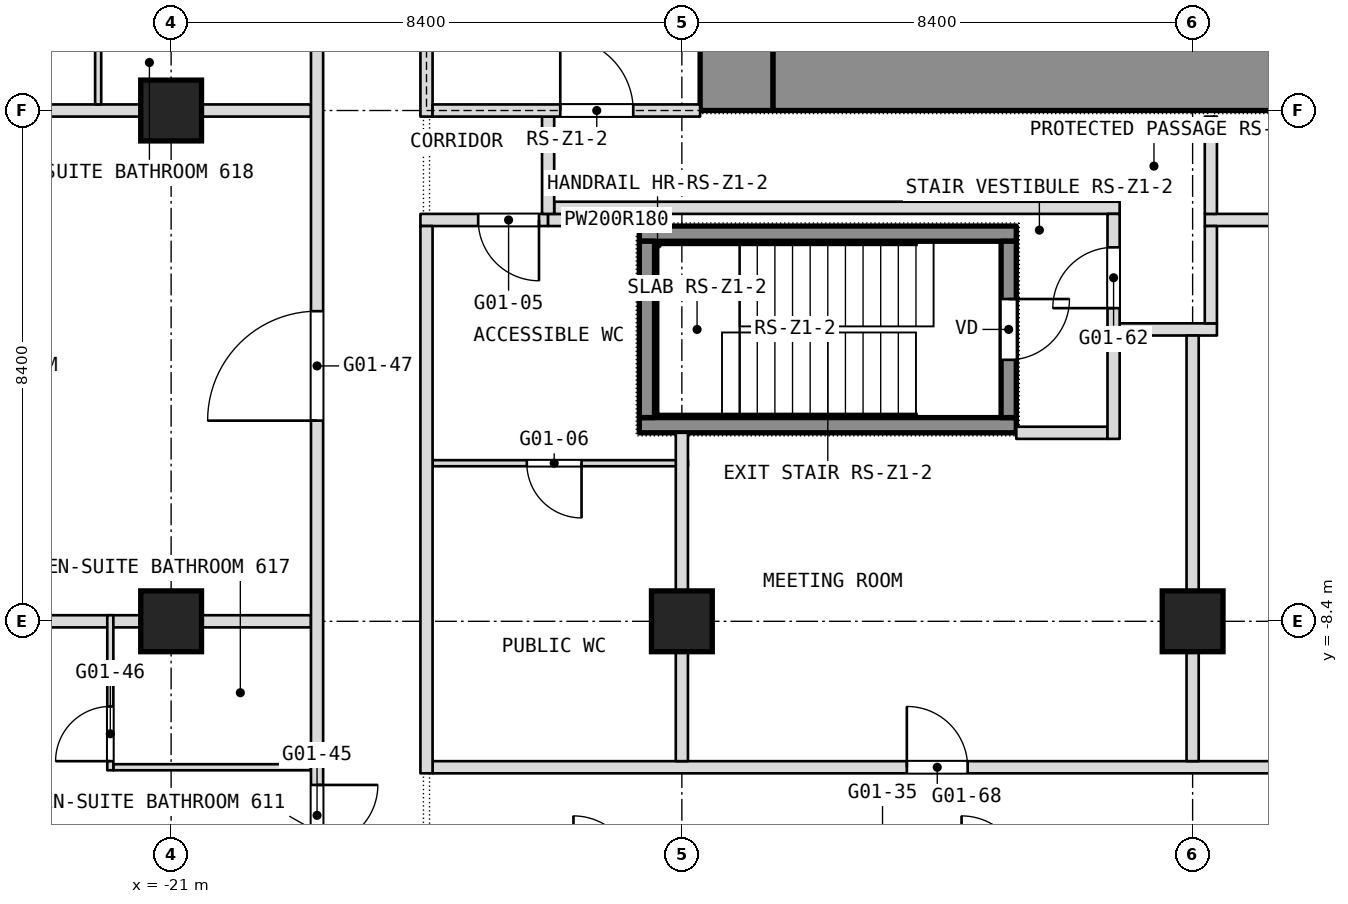
"""IFC4 building model, lengths in metres.
Left out: names, types, materials, properties, quantities, classifications, styles, units other than length and angle.
Written with IfcOpenShell. Run it as: python <this file> out.ifc"""

import sys

from ifc_helpers import new_model, si_unit, direction, frame, frame_2d, origin, origin_2d, place, context, subcontext, project, spatial, rectangle, extrude, element, fill, save


model = new_model("IFC4")
c1 = context("Model", 3, precision=1e-05, world=origin(), true_north=direction((0.0, 1.0)))
c2 = subcontext(c1, "Body", "Model", "MODEL_VIEW")
j1 = project(units=[si_unit("LENGTHUNIT", "METRE"), si_unit("PLANEANGLEUNIT", "RADIAN")], contexts=[c1])
p1 = place(None, origin())
s1 = spatial("IfcSite", under=j1, at=p1, CompositionType="ELEMENT")
p2 = place(p1, origin())
s2 = spatial("IfcBuilding", under=s1, at=p2, CompositionType="ELEMENT")
p3 = place(p2, frame((0.0, 0.0, 36.5)))
s3 = spatial("IfcBuildingStorey", under=s2, at=p3, CompositionType="ELEMENT", Elevation=36.5)
p4 = place(p3, frame((-11.7, 0.0, 0.0), z_axis=(0.0, 0.0, 1.0), x_axis=(0.0, 1.0, 0.0)))
e1 = element("IfcWall", 1, at=p4, inside=s3, PredefinedType="SHEAR", context=c2, shape_type="SweptSolid", body=[
    extrude(rectangle(XDim=16.8, YDim=1.2, at=frame_2d((8.4, 0.0))), origin(), (0.0, 0.0, 1.0), 3.6),
])
p5 = place(p4, frame((2.3, 0.0, 0.0)))
e2 = element("IfcOpeningElement", 2, at=p5, cuts=e1, PredefinedType="OPENING", context=c2, shape_type="SweptSolid", body=[
    extrude(rectangle(XDim=1.1, YDim=2.1, at=frame_2d((0.55, 1.05))), frame((0.0, 0.6, 0.0), z_axis=(0.0, -1.0, 0.0), x_axis=(1.0, 0.0, 0.0)), (0.0, 0.0, 1.0), 1.2),
])
p6 = place(p4, frame((4.85, 0.0, 0.0)))
e3 = element("IfcOpeningElement", 3, at=p6, cuts=e1, PredefinedType="OPENING", context=c2, shape_type="SweptSolid", body=[
    extrude(rectangle(XDim=1.1, YDim=2.1, at=frame_2d((0.55, 1.05))), frame((0.0, 0.6, 0.0), z_axis=(0.0, -1.0, 0.0), x_axis=(1.0, 0.0, 0.0)), (0.0, 0.0, 1.0), 1.2),
])
p7 = place(p4, frame((6.825, 0.0, 0.0)))
e4 = element("IfcOpeningElement", 4, at=p7, cuts=e1, PredefinedType="OPENING", context=c2, shape_type="SweptSolid", body=[
    extrude(rectangle(XDim=1.2, YDim=2.1, at=frame_2d((0.6, 1.05))), frame((0.0, 0.6, 0.0), z_axis=(0.0, -1.0, 0.0), x_axis=(1.0, 0.0, 0.0)), (0.0, 0.0, 1.0), 1.2),
])
p8 = place(p4, frame((13.4, 0.0, 0.0)))
e5 = element("IfcOpeningElement", 5, at=p8, cuts=e1, PredefinedType="OPENING", context=c2, shape_type="SweptSolid", body=[
    extrude(rectangle(XDim=1.1, YDim=2.1, at=frame_2d((0.55, 1.05))), frame((0.0, 0.6, 0.0), z_axis=(0.0, -1.0, 0.0), x_axis=(1.0, 0.0, 0.0)), (0.0, 0.0, 1.0), 1.2),
])
p9 = place(p4, frame((10.85, 0.0, 0.0)))
e6 = element("IfcOpeningElement", 6, at=p9, cuts=e1, PredefinedType="OPENING", context=c2, shape_type="SweptSolid", body=[
    extrude(rectangle(XDim=1.1, YDim=2.1, at=frame_2d((0.55, 1.05))), frame((0.0, 0.6, 0.0), z_axis=(0.0, -1.0, 0.0), x_axis=(1.0, 0.0, 0.0)), (0.0, 0.0, 1.0), 1.2),
])
p10 = place(p4, frame((8.775, 0.0, 0.0)))
e7 = element("IfcOpeningElement", 7, at=p10, cuts=e1, PredefinedType="OPENING", context=c2, shape_type="SweptSolid", body=[
    extrude(rectangle(XDim=1.2, YDim=2.1, at=frame_2d((0.6, 1.05))), frame((0.0, 0.6, 0.0), z_axis=(0.0, -1.0, 0.0), x_axis=(1.0, 0.0, 0.0)), (0.0, 0.0, 1.0), 1.2),
])
p11 = place(p3, frame((-11.1, 0.6, 0.0), z_axis=(0.0, 0.0, 1.0), x_axis=(1.0, 0.0, 0.0)))
e8 = element("IfcWall", 8, at=p11, inside=s3, PredefinedType="SHEAR", context=c2, shape_type="SweptSolid", body=[
    extrude(rectangle(XDim=22.2, YDim=1.2, at=frame_2d((11.1, 0.0))), origin(), (0.0, 0.0, 1.0), 3.6),
])
p12 = place(p3, frame((-21.0, -8.4, -0.15), z_axis=(0.0, 0.0, 1.0), x_axis=(1.0, 0.0, 0.0)))
e9 = element("IfcColumn", 9, at=p12, inside=s3, PredefinedType="COLUMN", context=c2, shape_type="SweptSolid", body=[
    extrude(rectangle(XDim=1.0, YDim=1.0, at=origin_2d()), origin(), (0.0, 0.0, 1.0), 3.75),
])
p13 = place(p3, frame((-21.0, 0.0, 0.0), z_axis=(0.0, 0.0, 1.0), x_axis=(1.0, 0.0, 0.0)))
e10 = element("IfcColumn", 10, at=p13, inside=s3, PredefinedType="COLUMN", context=c2, shape_type="SweptSolid", body=[
    extrude(rectangle(XDim=1.0, YDim=1.0, at=origin_2d()), origin(), (0.0, 0.0, 1.0), 3.6),
])
for number, where, z_axis, x_axis in (
    (11, (-12.6, -8.4, -0.15), (0.0, 0.0, 1.0), (1.0, 0.0, 0.0)),
    (12, (-4.2, -8.4, -0.15), (0.0, 0.0, 1.0), (1.0, 0.0, 0.0)),
):
    element("IfcColumn", number, at=place(p3, frame(where, z_axis=z_axis, x_axis=x_axis)), inside=s3, PredefinedType="COLUMN", context=c2, shape_type="SweptSolid", body=[
        extrude(rectangle(XDim=1.0, YDim=1.0, at=origin_2d()), origin(), (0.0, 0.0, 1.0), 3.75),
    ])
p14 = place(p3, frame((-21.95, -10.8, 0.0), z_axis=(0.0, 0.0, 1.0), x_axis=(1.0, 0.0, 0.0)))
e13 = element("IfcWall", 13, at=p14, inside=s3, PredefinedType="PARTITIONING", context=c2, shape_type="SweptSolid", body=[
    extrude(rectangle(XDim=3.25, YDim=0.1, at=frame_2d((1.625, 0.0))), origin(), (0.0, 0.0, 1.0), 3.34),
])
p15 = place(p3, frame((-16.7, -10.8, 0.0), z_axis=(0.0, 0.0, 1.0), x_axis=(1.0, 0.0, 0.0)))
e14 = element("IfcWall", 14, at=p15, inside=s3, PredefinedType="PARTITIONING", context=c2, shape_type="SweptSolid", body=[
    extrude(rectangle(XDim=18.5, YDim=0.2, at=frame_2d((9.25, 0.0))), origin(), (0.0, 0.0, 1.0), 3.34),
])
p16 = place(p15, frame((7.8, 0.0, 0.0)))
e15 = element("IfcOpeningElement", 15, at=p16, cuts=e14, PredefinedType="OPENING", context=c2, shape_type="SweptSolid", body=[
    extrude(rectangle(XDim=1.0, YDim=2.1, at=frame_2d((0.5, 1.05))), frame((0.0, 0.1, 0.0), z_axis=(0.0, -1.0, 0.0), x_axis=(1.0, 0.0, 0.0)), (0.0, 0.0, 1.0), 0.2),
])
p17 = place(p3, frame((-29.7, -8.4, 0.0), z_axis=(0.0, 0.0, 1.0), x_axis=(1.0, 0.0, 0.0)))
e16 = element("IfcWall", 16, at=p17, inside=s3, PredefinedType="PARTITIONING", context=c2, shape_type="SweptSolid", body=[
    extrude(rectangle(XDim=11.0, YDim=0.2, at=frame_2d((5.5, 0.0))), origin(), (0.0, 0.0, 1.0), 2.84),
])
p18 = place(p3, frame((-16.7, -5.8, 0.0), z_axis=(0.0, 0.0, 1.0), x_axis=(1.0, 0.0, 0.0)))
e17 = element("IfcWall", 17, at=p18, inside=s3, PredefinedType="PARTITIONING", context=c2, shape_type="SweptSolid", body=[
    extrude(rectangle(XDim=4.2, YDim=0.1, at=frame_2d((2.1, 0.0))), origin(), (0.0, 0.0, 1.0), 3.34),
])
p19 = place(p18, frame((1.55, 0.0, 0.0)))
e18 = element("IfcOpeningElement", 18, at=p19, cuts=e17, PredefinedType="OPENING", context=c2, shape_type="SweptSolid", body=[
    extrude(rectangle(XDim=0.9, YDim=2.1, at=frame_2d((0.45, 1.05))), frame((0.0, 0.05, 0.0), z_axis=(0.0, -1.0, 0.0), x_axis=(1.0, 0.0, 0.0)), (0.0, 0.0, 1.0), 0.1),
])
p20 = place(p3, frame((-7.1, -5.3, 0.0), z_axis=(0.0, 0.0, 1.0), x_axis=(1.0, 0.0, 0.0)))
e19 = element("IfcWall", 19, at=p20, inside=s3, PredefinedType="PARTITIONING", context=c2, shape_type="SweptSolid", body=[
    extrude(rectangle(XDim=1.5, YDim=0.2, at=frame_2d((0.75, 0.0))), origin(), (0.0, 0.0, 1.0), 3.34),
])
p21 = place(p3, frame((-5.4, -3.6, 0.0), z_axis=(0.0, 0.0, 1.0), x_axis=(1.0, 0.0, 0.0)))
e20 = element("IfcWall", 20, at=p21, inside=s3, PredefinedType="PARTITIONING", context=c2, shape_type="SweptSolid", body=[
    extrude(rectangle(XDim=1.6, YDim=0.2, at=frame_2d((0.8, 0.0))), origin(), (0.0, 0.0, 1.0), 3.34),
])
p22 = place(p3, frame((-16.9, -1.8, 0.0), z_axis=(0.0, 0.0, 1.0), x_axis=(1.0, 0.0, 0.0)))
e21 = element("IfcWall", 21, at=p22, inside=s3, PredefinedType="PARTITIONING", context=c2, shape_type="SweptSolid", body=[
    extrude(rectangle(XDim=2.1, YDim=0.2, at=frame_2d((1.05, 0.0))), origin(), (0.0, 0.0, 1.0), 3.34),
])
p23 = place(p22, frame((0.95, 0.0, 0.0)))
e22 = element("IfcOpeningElement", 22, at=p23, cuts=e21, PredefinedType="OPENING", context=c2, shape_type="SweptSolid", body=[
    extrude(rectangle(XDim=1.0, YDim=2.1, at=frame_2d((0.5, 1.05))), frame((0.0, 0.1, 0.0), z_axis=(0.0, -1.0, 0.0), x_axis=(1.0, 0.0, 0.0)), (0.0, 0.0, 1.0), 0.2),
])
p24 = place(p3, frame((-4.0, -1.8, 0.0), z_axis=(0.0, 0.0, 1.0), x_axis=(1.0, 0.0, 0.0)))
e23 = element("IfcWall", 23, at=p24, inside=s3, PredefinedType="PARTITIONING", context=c2, shape_type="SweptSolid", body=[
    extrude(rectangle(XDim=5.8, YDim=0.2, at=frame_2d((2.9, 0.0))), origin(), (0.0, 0.0, 1.0), 3.34),
])
p25 = place(p24, frame((2.25, 0.0, 0.0)))
e24 = element("IfcOpeningElement", 24, at=p25, cuts=e23, PredefinedType="OPENING", context=c2, shape_type="SweptSolid", body=[
    extrude(rectangle(XDim=1.0, YDim=2.1, at=frame_2d((0.5, 1.05))), frame((0.0, 0.1, 0.0), z_axis=(0.0, -1.0, 0.0), x_axis=(1.0, 0.0, 0.0)), (0.0, 0.0, 1.0), 0.2),
])
p26 = place(p3, frame((-14.8, -1.8, 0.0), z_axis=(0.0, 0.0, 1.0), x_axis=(1.0, 0.0, 0.0)))
e25 = element("IfcWall", 25, at=p26, inside=s3, PredefinedType="PARTITIONING", context=c2, shape_type="SweptSolid", body=[
    extrude(rectangle(XDim=1.5, YDim=0.2, at=frame_2d((0.75, 0.0))), origin(), (0.0, 0.0, 1.0), 3.34),
])
p27 = place(p3, frame((-14.7, -1.6, 0.0), z_axis=(0.0, 0.0, 1.0), x_axis=(1.0, 0.0, 0.0)))
e26 = element("IfcWall", 26, at=p27, inside=s3, PredefinedType="PARTITIONING", context=c2, shape_type="SweptSolid", body=[
    extrude(rectangle(XDim=9.3, YDim=0.2, at=frame_2d((4.65, 0.0))), origin(), (0.0, 0.0, 1.0), 3.34),
])
p28 = place(p3, frame((-29.7, 0.0, 0.0), z_axis=(0.0, 0.0, 1.0), x_axis=(1.0, 0.0, 0.0)))
e27 = element("IfcWall", 27, at=p28, inside=s3, PredefinedType="PARTITIONING", context=c2, shape_type="SweptSolid", body=[
    extrude(rectangle(XDim=11.0, YDim=0.2, at=frame_2d((5.5, 0.0))), origin(), (0.0, 0.0, 1.0), 2.84),
])
p29 = place(p3, frame((-3.9, -3.5, 0.0), z_axis=(0.0, 0.0, 1.0), x_axis=(0.0, 1.0, 0.0)))
e28 = element("IfcWall", 28, at=p29, inside=s3, PredefinedType="PARTITIONING", context=c2, shape_type="SweptSolid", body=[
    extrude(rectangle(XDim=1.6, YDim=0.2, at=frame_2d((0.8, 0.0))), origin(), (0.0, 0.0, 1.0), 3.34),
])
p30 = place(p3, frame((-3.9, -1.7, 0.0), z_axis=(0.0, 0.0, 1.0), x_axis=(0.0, 1.0, 0.0)))
e29 = element("IfcWall", 29, at=p30, inside=s3, PredefinedType="PARTITIONING", context=c2, shape_type="SweptSolid", body=[
    extrude(rectangle(XDim=1.6, YDim=0.2, at=frame_2d((0.8, 0.0))), origin(), (0.0, 0.0, 1.0), 3.34),
])
p31 = place(p3, frame((-4.2, -10.7, 0.0), z_axis=(0.0, 0.0, 1.0), x_axis=(0.0, 1.0, 0.0)))
e30 = element("IfcWall", 30, at=p31, inside=s3, PredefinedType="PARTITIONING", context=c2, shape_type="SweptSolid", body=[
    extrude(rectangle(XDim=7.0, YDim=0.2, at=frame_2d((3.5, 0.0))), origin(), (0.0, 0.0, 1.0), 3.34),
])
p32 = place(p3, frame((-5.5, -5.4, 0.0), z_axis=(0.0, 0.0, 1.0), x_axis=(0.0, 1.0, 0.0)))
e31 = element("IfcWall", 31, at=p32, inside=s3, PredefinedType="PARTITIONING", context=c2, shape_type="SweptSolid", body=[
    extrude(rectangle(XDim=3.7, YDim=0.2, at=frame_2d((1.85, 0.0))), origin(), (0.0, 0.0, 1.0), 3.34),
])
p33 = place(p32, frame((2.15, 0.0, 0.0)))
e32 = element("IfcOpeningElement", 32, at=p33, cuts=e31, PredefinedType="OPENING", context=c2, shape_type="SweptSolid", body=[
    extrude(rectangle(XDim=1.0, YDim=2.1, at=frame_2d((0.5, 1.05))), frame((0.0, 0.1, 0.0), z_axis=(0.0, -1.0, 0.0), x_axis=(1.0, 0.0, 0.0)), (0.0, 0.0, 1.0), 0.2),
])
p34 = place(p3, frame((-12.6, -10.7, 0.0), z_axis=(0.0, 0.0, 1.0), x_axis=(0.0, 1.0, 0.0)))
e33 = element("IfcWall", 33, at=p34, inside=s3, PredefinedType="PARTITIONING", context=c2, shape_type="SweptSolid", body=[
    extrude(rectangle(XDim=5.4, YDim=0.2, at=frame_2d((2.7, 0.0))), origin(), (0.0, 0.0, 1.0), 3.34),
])
p35 = place(p3, frame((-14.8, -1.7, 0.0), z_axis=(0.0, 0.0, 1.0), x_axis=(0.0, 1.0, 0.0)))
e34 = element("IfcWall", 34, at=p35, inside=s3, PredefinedType="PARTITIONING", context=c2, shape_type="SweptSolid", body=[
    extrude(rectangle(XDim=1.6, YDim=0.2, at=frame_2d((0.8, 0.0))), origin(), (0.0, 0.0, 1.0), 3.34),
])
p36 = place(p3, frame((-16.8, -10.9, 0.0), z_axis=(0.0, 0.0, 1.0), x_axis=(0.0, 1.0, 0.0)))
e35 = element("IfcWall", 35, at=p36, inside=s3, PredefinedType="PARTITIONING", context=c2, shape_type="SweptSolid", body=[
    extrude(rectangle(XDim=9.0, YDim=0.2, at=frame_2d((4.5, 0.0))), origin(), (0.0, 0.0, 1.0), 3.34),
])
p37 = place(p3, frame((-18.6, -16.665, 0.0), z_axis=(0.0, 0.0, 1.0), x_axis=(0.0, 1.0, 0.0)))
e36 = element("IfcWall", 36, at=p37, inside=s3, PredefinedType="PARTITIONING", context=c2, shape_type="SweptSolid", body=[
    extrude(rectangle(XDim=23.565, YDim=0.2, at=frame_2d((11.782, 0.0))), origin(), (0.0, 0.0, 1.0), 3.34),
])
p38 = place(p37, frame((2.991, 0.0, 0.0)))
e37 = element("IfcOpeningElement", 37, at=p38, cuts=e36, PredefinedType="OPENING", context=c2, shape_type="SweptSolid", body=[
    extrude(rectangle(XDim=1.0, YDim=2.1, at=frame_2d((0.5, 1.05))), frame((0.0, 0.1, 0.0), z_axis=(0.0, -1.0, 0.0), x_axis=(1.0, 0.0, 0.0)), (0.0, 0.0, 1.0), 0.2),
])
p39 = place(p37, frame((4.574, 0.0, 0.0)))
e38 = element("IfcOpeningElement", 38, at=p39, cuts=e36, PredefinedType="OPENING", context=c2, shape_type="SweptSolid", body=[
    extrude(rectangle(XDim=1.0, YDim=2.1, at=frame_2d((0.5, 1.05))), frame((0.0, 0.1, 0.0), z_axis=(0.0, -1.0, 0.0), x_axis=(1.0, 0.0, 0.0)), (0.0, 0.0, 1.0), 0.2),
])
p40 = place(p37, frame((11.565, 0.0, 0.0)))
e39 = element("IfcOpeningElement", 39, at=p40, cuts=e36, PredefinedType="OPENING", context=c2, shape_type="SweptSolid", body=[
    extrude(rectangle(XDim=1.8, YDim=2.1, at=frame_2d((0.9, 1.05))), frame((0.0, 0.1, 0.0), z_axis=(0.0, -1.0, 0.0), x_axis=(1.0, 0.0, 0.0)), (0.0, 0.0, 1.0), 0.2),
])
p41 = place(p3, frame((-22.0, -10.85, 0.0), z_axis=(0.0, 0.0, 1.0), x_axis=(0.0, 1.0, 0.0)))
e40 = element("IfcWall", 40, at=p41, inside=s3, PredefinedType="PARTITIONING", context=c2, shape_type="SweptSolid", body=[
    extrude(rectangle(XDim=2.55, YDim=0.1, at=frame_2d((1.275, 0.0))), origin(), (0.0, 0.0, 1.0), 3.34),
])
p42 = place(p41, frame((0.15, 0.0, 0.0)))
e41 = element("IfcOpeningElement", 41, at=p42, cuts=e40, PredefinedType="OPENING", context=c2, shape_type="SweptSolid", body=[
    extrude(rectangle(XDim=0.9, YDim=2.1, at=frame_2d((0.45, 1.05))), frame((0.0, 0.05, 0.0), z_axis=(0.0, -1.0, 0.0), x_axis=(1.0, 0.0, 0.0)), (0.0, 0.0, 1.0), 0.1),
])
p43 = place(p3, frame((-22.2, 0.1, 0.0), z_axis=(0.0, 0.0, 1.0), x_axis=(0.0, 1.0, 0.0)))
e42 = element("IfcWall", 42, at=p43, inside=s3, PredefinedType="PARTITIONING", context=c2, shape_type="SweptSolid", body=[
    extrude(rectangle(XDim=2.25, YDim=0.1, at=frame_2d((1.125, 0.0))), origin(), (0.0, 0.0, 1.0), 3.34),
])
p44 = place(p3, frame((-16.8, -0.1, 0.0), z_axis=(0.0, 0.0, 1.0), x_axis=(0.0, 1.0, 0.0)))
e43 = element("IfcWall", 43, at=p44, inside=s3, PredefinedType="PARTITIONING", context=c2, shape_type="SweptSolid", body=[
    extrude(rectangle(XDim=17.0, YDim=0.2, at=frame_2d((8.5, 0.0))), origin(), (0.0, 0.0, 1.0), 3.34),
])
p45 = place(p44, frame((2.2, 0.0, 0.0)))
e44 = element("IfcOpeningElement", 44, at=p45, cuts=e43, PredefinedType="OPENING", context=c2, shape_type="SweptSolid", body=[
    extrude(rectangle(XDim=1.8, YDim=2.1, at=frame_2d((0.9, 1.05))), frame((0.0, 0.1, 0.0), z_axis=(0.0, -1.0, 0.0), x_axis=(1.0, 0.0, 0.0)), (0.0, 0.0, 1.0), 0.2),
])
p46 = place(p44, frame((7.2, 0.0, 0.0)))
e45 = element("IfcOpeningElement", 45, at=p46, cuts=e43, PredefinedType="OPENING", context=c2, shape_type="SweptSolid", body=[
    extrude(rectangle(XDim=1.8, YDim=2.1, at=frame_2d((0.9, 1.05))), frame((0.0, 0.1, 0.0), z_axis=(0.0, -1.0, 0.0), x_axis=(1.0, 0.0, 0.0)), (0.0, 0.0, 1.0), 0.2),
])
p47 = place(p3, frame((-16.7, 0.0, 0.0), z_axis=(0.0, 0.0, 1.0), x_axis=(1.0, 0.0, 0.0)))
e46 = element("IfcWall", 46, at=p47, inside=s3, PredefinedType="PARTITIONING", context=c2, shape_type="SweptSolid", body=[
    extrude(rectangle(XDim=4.4, YDim=0.2, at=frame_2d((2.2, 0.0))), origin(), (0.0, 0.0, 1.0), 2.84),
])
p48 = place(p47, frame((2.1, 0.0, 0.0)))
e47 = element("IfcOpeningElement", 47, at=p48, cuts=e46, PredefinedType="OPENING", context=c2, shape_type="SweptSolid", body=[
    extrude(rectangle(XDim=1.2, YDim=2.1, at=frame_2d((0.6, 1.05))), frame((0.0, 0.1, 0.0), z_axis=(0.0, -1.0, 0.0), x_axis=(1.0, 0.0, 0.0)), (0.0, 0.0, 1.0), 0.2),
])
for number, where, z_axis, x_axis in (
    (48, (-13.3, -5.175, -0.15), (0.0, 0.0, 1.0), (1.0, 0.0, 0.0)),
    (49, (-13.3, -2.025, -0.15), (0.0, 0.0, 1.0), (1.0, 0.0, 0.0)),
):
    element("IfcWall", number, at=place(p3, frame(where, z_axis=z_axis, x_axis=x_axis)), inside=s3, PredefinedType="SHEAR", context=c2, shape_type="SweptSolid", body=[
        extrude(rectangle(XDim=6.2, YDim=0.25, at=frame_2d((3.1, 0.0))), origin(), (0.0, 0.0, 1.0), 3.85),
    ])
p49 = place(p3, frame((-13.175, -5.05, -0.15), z_axis=(0.0, 0.0, 1.0), x_axis=(0.0, 1.0, 0.0)))
e50 = element("IfcWall", 50, at=p49, inside=s3, PredefinedType="SHEAR", context=c2, shape_type="SweptSolid", body=[
    extrude(rectangle(XDim=2.9, YDim=0.25, at=frame_2d((1.45, 0.0))), origin(), (0.0, 0.0, 1.0), 3.85),
])
p50 = place(p3, frame((-7.225, -5.05, -0.15), z_axis=(0.0, 0.0, 1.0), x_axis=(0.0, 1.0, 0.0)))
e51 = element("IfcWall", 51, at=p50, inside=s3, PredefinedType="SHEAR", context=c2, shape_type="SweptSolid", body=[
    extrude(rectangle(XDim=2.9, YDim=0.25, at=frame_2d((1.45, 0.0))), origin(), (0.0, 0.0, 1.0), 3.85),
])
p51 = place(p50, frame((0.95, 0.0, 0.0)))
e52 = element("IfcOpeningElement", 52, at=p51, cuts=e51, PredefinedType="OPENING", context=c2, shape_type="SweptSolid", body=[
    extrude(rectangle(XDim=1.0, YDim=2.1, at=frame_2d((0.5, 1.05))), frame((0.0, 0.125, 0.0), z_axis=(0.0, -1.0, 0.0), x_axis=(1.0, 0.0, 0.0)), (0.0, 0.0, 1.0), 0.25),
])
p52 = place(p16, origin())
e53 = element("IfcDoor", 53, at=p52, inside=s3, OperationType="SINGLE_SWING_LEFT", PredefinedType="DOOR", context=c2, shape_type="SweptSolid", body=[
    extrude(rectangle(XDim=1.0, YDim=2.1, at=frame_2d((0.5, 1.05))), frame((0.0, 0.025, 0.0), z_axis=(0.0, -1.0, 0.0), x_axis=(1.0, 0.0, 0.0)), (0.0, 0.0, 1.0), 0.05),
])
fill(e15, e53)
p53 = place(p19, origin())
e54 = element("IfcDoor", 54, at=p53, inside=s3, OperationType="SINGLE_SWING_RIGHT", PredefinedType="DOOR", context=c2, shape_type="SweptSolid", body=[
    extrude(rectangle(XDim=0.9, YDim=2.1, at=frame_2d((0.45, 1.05))), frame((0.0, 0.025, 0.0), z_axis=(0.0, -1.0, 0.0), x_axis=(1.0, 0.0, 0.0)), (0.0, 0.0, 1.0), 0.05),
])
fill(e18, e54)
p54 = place(p23, origin())
e55 = element("IfcDoor", 55, at=p54, inside=s3, OperationType="SINGLE_SWING_LEFT", PredefinedType="DOOR", context=c2, shape_type="SweptSolid", body=[
    extrude(rectangle(XDim=1.0, YDim=2.1, at=frame_2d((0.5, 1.05))), frame((0.0, 0.025, 0.0), z_axis=(0.0, -1.0, 0.0), x_axis=(1.0, 0.0, 0.0)), (0.0, 0.0, 1.0), 0.05),
])
fill(e22, e55)
p55 = place(p33, origin())
e56 = element("IfcDoor", 56, at=p55, inside=s3, OperationType="SINGLE_SWING_RIGHT", PredefinedType="DOOR", context=c2, shape_type="SweptSolid", body=[
    extrude(rectangle(XDim=1.0, YDim=2.1, at=frame_2d((0.5, 1.05))), frame((0.0, 0.025, 0.0), z_axis=(0.0, -1.0, 0.0), x_axis=(1.0, 0.0, 0.0)), (0.0, 0.0, 1.0), 0.05),
])
fill(e32, e56)
p56 = place(p39, origin())
e57 = element("IfcDoor", 57, at=p56, inside=s3, OperationType="SINGLE_SWING_RIGHT", PredefinedType="DOOR", context=c2, shape_type="SweptSolid", body=[
    extrude(rectangle(XDim=1.0, YDim=2.1, at=frame_2d((0.5, 1.05))), frame((0.0, 0.025, 0.0), z_axis=(0.0, -1.0, 0.0), x_axis=(1.0, 0.0, 0.0)), (0.0, 0.0, 1.0), 0.05),
])
fill(e38, e57)
p57 = place(p40, origin())
e58 = element("IfcDoor", 58, at=p57, inside=s3, OperationType="DOUBLE_DOOR_SINGLE_SWING", PredefinedType="DOOR", context=c2, shape_type="SweptSolid", body=[
    extrude(rectangle(XDim=1.8, YDim=2.1, at=frame_2d((0.9, 1.05))), frame((0.0, 0.025, 0.0), z_axis=(0.0, -1.0, 0.0), x_axis=(1.0, 0.0, 0.0)), (0.0, 0.0, 1.0), 0.05),
])
fill(e39, e58)
p58 = place(p42, origin())
e59 = element("IfcDoor", 59, at=p58, inside=s3, OperationType="SINGLE_SWING_RIGHT", PredefinedType="DOOR", context=c2, shape_type="SweptSolid", body=[
    extrude(rectangle(XDim=0.9, YDim=2.1, at=frame_2d((0.45, 1.05))), frame((0.0, 0.025, 0.0), z_axis=(0.0, -1.0, 0.0), x_axis=(1.0, 0.0, 0.0)), (0.0, 0.0, 1.0), 0.05),
])
fill(e41, e59)
p59 = place(p51, origin())
e60 = element("IfcDoor", 60, at=p59, inside=s3, OperationType="SINGLE_SWING_LEFT", PredefinedType="DOOR", context=c2, shape_type="SweptSolid", body=[
    extrude(rectangle(XDim=1.0, YDim=2.1, at=frame_2d((0.5, 1.05))), frame((0.0, 0.025, 0.0), z_axis=(0.0, -1.0, 0.0), x_axis=(1.0, 0.0, 0.0)), (0.0, 0.0, 1.0), 0.05),
])
fill(e52, e60)
p60 = place(p48, origin())
e61 = element("IfcDoor", 61, at=p60, inside=s3, OperationType="SINGLE_SWING_LEFT", PredefinedType="DOOR", context=c2, shape_type="SweptSolid", body=[
    extrude(rectangle(XDim=1.2, YDim=2.1, at=frame_2d((0.6, 1.05))), frame((0.0, 0.025, 0.0), z_axis=(0.0, -1.0, 0.0), x_axis=(1.0, 0.0, 0.0)), (0.0, 0.0, 1.0), 0.05),
])
fill(e47, e61)
save(model, sys.argv[1])
